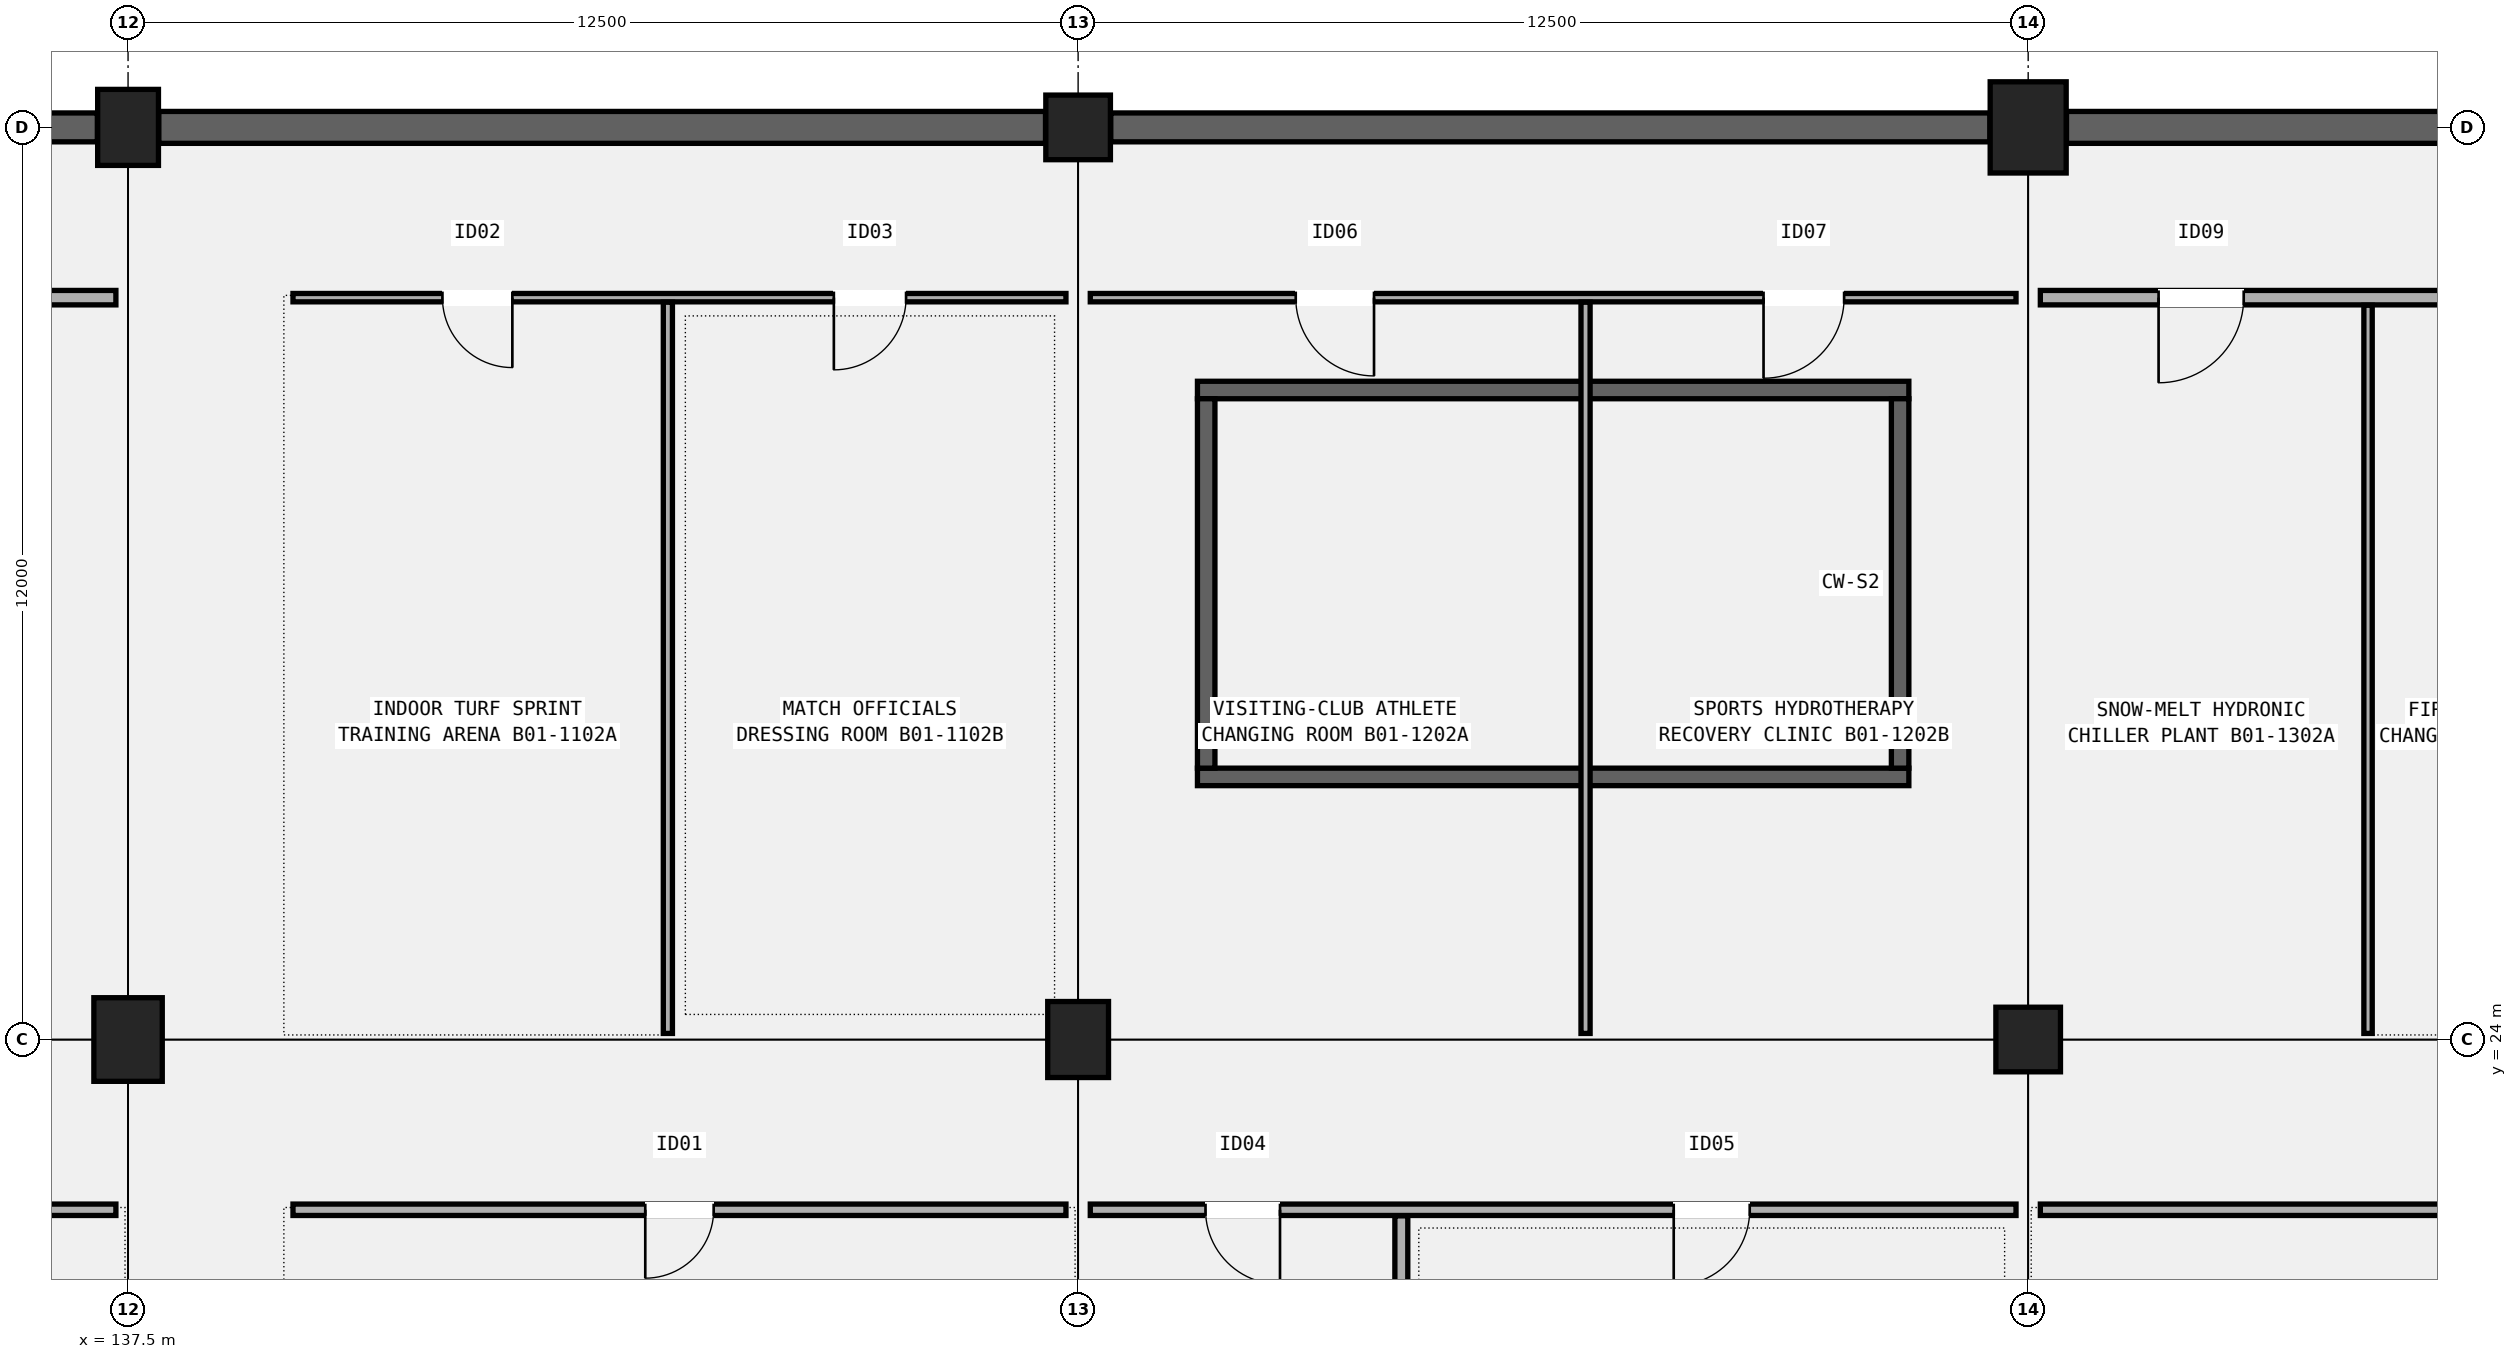
"""IFC4 building model, lengths in metres.
Left out: names, types, materials, properties, quantities, classifications, styles, units other than length and angle.
Written with IfcOpenShell. Run it as: python <this file> out.ifc"""

import sys

from ifc_helpers import new_model, si_unit, direction, frame, frame_2d, origin, origin_2d, place, context, subcontext, project, spatial, rectangle, circle, extrude, element, fill, save


model = new_model("IFC4")
c1 = context("Model", 3, precision=1e-05, world=origin(), true_north=direction((0.0, 1.0)))
c2 = subcontext(c1, "Body", "Model", "MODEL_VIEW")
j1 = project(units=[si_unit("LENGTHUNIT", "METRE"), si_unit("PLANEANGLEUNIT", "RADIAN")], contexts=[c1])
p1 = place(None, origin())
s1 = spatial("IfcSite", under=j1, at=p1, CompositionType="ELEMENT")
p2 = place(p1, origin())
s2 = spatial("IfcBuilding", under=s1, at=p2, CompositionType="ELEMENT")
p3 = place(p2, frame((0.0, 0.0, -4.8)))
s3 = spatial("IfcBuildingStorey", under=s2, at=p3, CompositionType="ELEMENT", Elevation=-4.8)
p4 = place(p3, frame((137.5, 24.0, 0.0), z_axis=(0.0, 0.0, 1.0), x_axis=(1.0, 0.0, 0.0)))
e1 = element("IfcColumn", 1, at=p4, inside=s3, PredefinedType="COLUMN", context=c2, shape_type="SweptSolid", body=[
    extrude(rectangle(XDim=0.9, YDim=1.1, at=origin_2d()), origin(), (0.0, 0.0, 1.0), 4.8),
])
for number, where, z_axis, x_axis in (
    (2, (137.5, 36.0, 0.0), (0.0, 0.0, 1.0), (1.0, 0.0, 0.0)),
    (3, (150.0, 24.0, 0.0), (0.0, 0.0, 1.0), (1.0, 0.0, 0.0)),
):
    element("IfcColumn", number, at=place(p3, frame(where, z_axis=z_axis, x_axis=x_axis)), inside=s3, PredefinedType="COLUMN", context=c2, shape_type="SweptSolid", body=[
        extrude(rectangle(XDim=0.8, YDim=1.0, at=origin_2d()), origin(), (0.0, 0.0, 1.0), 4.8),
    ])
for number, where, z_axis, x_axis in (
    (4, (150.0, 36.0, 0.0), (0.0, 0.0, 1.0), (1.0, 0.0, 0.0)),
    (5, (162.5, 24.0, 0.0), (0.0, 0.0, 1.0), (1.0, 0.0, 0.0)),
):
    element("IfcColumn", number, at=place(p3, frame(where, z_axis=z_axis, x_axis=x_axis)), inside=s3, PredefinedType="COLUMN", context=c2, shape_type="SweptSolid", body=[
        extrude(circle(Radius=0.425, at=origin_2d()), origin(), (0.0, 0.0, 1.0), 4.8),
    ])
p5 = place(p3, frame((162.5, 36.0, 0.0), z_axis=(0.0, 0.0, 1.0), x_axis=(1.0, 0.0, 0.0)))
e6 = element("IfcColumn", 6, at=p5, inside=s3, PredefinedType="COLUMN", context=c2, shape_type="SweptSolid", body=[
    extrude(rectangle(XDim=1.0, YDim=1.2, at=origin_2d()), origin(), (0.0, 0.0, 1.0), 4.8),
])
p6 = place(p3, frame((125.454, 36.0, 0.0), z_axis=(0.0, 0.0, 1.0), x_axis=(1.0, 0.0, 0.0)))
e7 = element("IfcWall", 7, at=p6, inside=s3, PredefinedType="STANDARD", context=c2, shape_type="SweptSolid", body=[
    extrude(rectangle(XDim=11.642, YDim=0.38, at=frame_2d((5.821, 0.0))), origin(), (0.0, 0.0, 1.0), 4.46),
])
p7 = place(p3, frame((137.904, 36.0, 0.0), z_axis=(0.0, 0.0, 1.0), x_axis=(1.0, 0.0, 0.0)))
e8 = element("IfcWall", 8, at=p7, inside=s3, PredefinedType="STANDARD", context=c2, shape_type="SweptSolid", body=[
    extrude(rectangle(XDim=11.667, YDim=0.42, at=frame_2d((5.833, 0.0))), origin(), (0.0, 0.0, 1.0), 4.46),
])
p8 = place(p3, frame((150.429, 36.0, 0.0), z_axis=(0.0, 0.0, 1.0), x_axis=(1.0, 0.0, 0.0)))
e9 = element("IfcWall", 9, at=p8, inside=s3, PredefinedType="STANDARD", context=c2, shape_type="SweptSolid", body=[
    extrude(rectangle(XDim=11.567, YDim=0.38, at=frame_2d((5.784, 0.0))), origin(), (0.0, 0.0, 1.0), 4.46),
])
p9 = place(p3, frame((163.004, 36.0, 0.0), z_axis=(0.0, 0.0, 1.0), x_axis=(1.0, 0.0, 0.0)))
e10 = element("IfcWall", 10, at=p9, inside=s3, PredefinedType="STANDARD", context=c2, shape_type="SweptSolid", body=[
    extrude(rectangle(XDim=11.542, YDim=0.42, at=frame_2d((5.771, 0.0))), origin(), (0.0, 0.0, 1.0), 4.46),
])
for number, where, z_axis, x_axis in (
    (11, (151.57, 27.455, 0.0), (0.0, 0.0, 1.0), (1.0, 0.0, 0.0)),
    (12, (151.57, 32.545, 0.0), (0.0, 0.0, 1.0), (1.0, 0.0, 0.0)),
):
    element("IfcWall", number, at=place(p3, frame(where, z_axis=z_axis, x_axis=x_axis)), inside=s3, PredefinedType="SHEAR", context=c2, shape_type="SweptSolid", body=[
        extrude(rectangle(XDim=9.36, YDim=0.23, at=frame_2d((4.68, 0.0))), origin(), (0.0, 0.0, 1.0), 4.5),
    ])
for number, where, z_axis, x_axis in (
    (13, (151.685, 27.57, 0.0), (0.0, 0.0, 1.0), (0.0, 1.0, 0.0)),
    (14, (160.815, 27.57, 0.0), (0.0, 0.0, 1.0), (0.0, 1.0, 0.0)),
):
    element("IfcWall", number, at=place(p3, frame(where, z_axis=z_axis, x_axis=x_axis)), inside=s3, PredefinedType="SHEAR", context=c2, shape_type="SweptSolid", body=[
        extrude(rectangle(XDim=4.86, YDim=0.23, at=frame_2d((2.43, 0.0))), origin(), (0.0, 0.0, 1.0), 4.5),
    ])
p10 = place(p3, frame((125.16, 21.76, 0.0), z_axis=(0.0, 0.0, 1.0), x_axis=(1.0, 0.0, 0.0)))
e15 = element("IfcWall", 15, at=p10, inside=s3, PredefinedType="PARTITIONING", context=c2, shape_type="SweptSolid", body=[
    extrude(rectangle(XDim=12.18, YDim=0.15, at=frame_2d((6.09, 0.0))), origin(), (0.0, 0.0, 1.0), 3.92),
])
p11 = place(p10, frame((6.915, 0.0, 0.0), z_axis=(0.0, 0.0, 1.0), x_axis=(-1.0, 0.0, 0.0)))
e16 = element("IfcOpeningElement", 16, at=p11, cuts=e15, PredefinedType="OPENING", context=c2, shape_type="SweptSolid", body=[
    extrude(rectangle(XDim=1.65, YDim=2.28, at=frame_2d((0.825, 1.14))), frame((0.0, 0.085, 0.0), z_axis=(0.0, -1.0, 0.0), x_axis=(1.0, 0.0, 0.0)), (0.0, 0.0, 1.0), 0.17),
])
p12 = place(p3, frame((125.16, 33.76, 0.0), z_axis=(0.0, 0.0, 1.0), x_axis=(1.0, 0.0, 0.0)))
e17 = element("IfcWall", 17, at=p12, inside=s3, PredefinedType="PARTITIONING", context=c2, shape_type="SweptSolid", body=[
    extrude(rectangle(XDim=12.18, YDim=0.19, at=frame_2d((6.09, 0.0))), origin(), (0.0, 0.0, 1.0), 3.92),
])
p13 = place(p12, frame((2.747, 0.0, 0.0), z_axis=(0.0, 0.0, 1.0), x_axis=(-1.0, 0.0, 0.0)))
e18 = element("IfcOpeningElement", 18, at=p13, cuts=e17, PredefinedType="OPENING", context=c2, shape_type="SweptSolid", body=[
    extrude(rectangle(XDim=1.7, YDim=2.32, at=frame_2d((0.85, 1.16))), frame((0.0, 0.105, 0.0), z_axis=(0.0, -1.0, 0.0), x_axis=(1.0, 0.0, 0.0)), (0.0, 0.0, 1.0), 0.21),
])
p14 = place(p12, frame((8.947, 0.0, 0.0), z_axis=(0.0, 0.0, 1.0), x_axis=(-1.0, 0.0, 0.0)))
e19 = element("IfcOpeningElement", 19, at=p14, cuts=e17, PredefinedType="OPENING", context=c2, shape_type="SweptSolid", body=[
    extrude(rectangle(XDim=1.76, YDim=2.3, at=frame_2d((0.88, 1.15))), frame((0.0, 0.105, 0.0), z_axis=(0.0, -1.0, 0.0), x_axis=(1.0, 0.0, 0.0)), (0.0, 0.0, 1.0), 0.21),
])
p15 = place(p3, frame((139.67, 21.76, 0.0), z_axis=(0.0, 0.0, 1.0), x_axis=(1.0, 0.0, 0.0)))
e20 = element("IfcWall", 20, at=p15, inside=s3, PredefinedType="PARTITIONING", context=c2, shape_type="SweptSolid", body=[
    extrude(rectangle(XDim=10.17, YDim=0.15, at=frame_2d((5.085, 0.0))), origin(), (0.0, 0.0, 1.0), 3.92),
])
p16 = place(p15, frame((5.535, 0.0, 0.0), z_axis=(0.0, 0.0, 1.0), x_axis=(-1.0, 0.0, 0.0)))
e21 = element("IfcOpeningElement", 21, at=p16, cuts=e20, PredefinedType="OPENING", context=c2, shape_type="SweptSolid", body=[
    extrude(rectangle(XDim=0.9, YDim=2.06, at=frame_2d((0.45, 1.03))), frame((0.0, 0.085, 0.0), z_axis=(0.0, -1.0, 0.0), x_axis=(1.0, 0.0, 0.0)), (0.0, 0.0, 1.0), 0.17),
])
p17 = place(p3, frame((139.67, 33.76, 0.0), z_axis=(0.0, 0.0, 1.0), x_axis=(1.0, 0.0, 0.0)))
e22 = element("IfcWall", 22, at=p17, inside=s3, PredefinedType="PARTITIONING", context=c2, shape_type="SweptSolid", body=[
    extrude(rectangle(XDim=10.17, YDim=0.11, at=frame_2d((5.085, 0.0))), origin(), (0.0, 0.0, 1.0), 3.92),
])
p18 = place(p17, frame((2.886, 0.0, 0.0), z_axis=(0.0, 0.0, 1.0), x_axis=(-1.0, 0.0, 0.0)))
e23 = element("IfcOpeningElement", 23, at=p18, cuts=e22, PredefinedType="OPENING", context=c2, shape_type="SweptSolid", body=[
    extrude(rectangle(XDim=0.92, YDim=2.1, at=frame_2d((0.46, 1.05))), frame((0.0, 0.065, 0.0), z_axis=(0.0, -1.0, 0.0), x_axis=(1.0, 0.0, 0.0)), (0.0, 0.0, 1.0), 0.13),
])
p19 = place(p17, frame((8.066, 0.0, 0.0), z_axis=(0.0, 0.0, 1.0), x_axis=(-1.0, 0.0, 0.0)))
e24 = element("IfcOpeningElement", 24, at=p19, cuts=e22, PredefinedType="OPENING", context=c2, shape_type="SweptSolid", body=[
    extrude(rectangle(XDim=0.95, YDim=2.12, at=frame_2d((0.475, 1.06))), frame((0.0, 0.065, 0.0), z_axis=(0.0, -1.0, 0.0), x_axis=(1.0, 0.0, 0.0)), (0.0, 0.0, 1.0), 0.13),
])
p20 = place(p3, frame((144.602, 24.08, 0.0), z_axis=(0.0, 0.0, 1.0), x_axis=(0.0, 1.0, 0.0)))
e25 = element("IfcWall", 25, at=p20, inside=s3, PredefinedType="PARTITIONING", context=c2, shape_type="SweptSolid", body=[
    extrude(rectangle(XDim=9.62, YDim=0.12, at=frame_2d((4.81, 0.0))), origin(), (0.0, 0.0, 1.0), 3.92),
])
p21 = place(p3, frame((150.16, 21.76, 0.0), z_axis=(0.0, 0.0, 1.0), x_axis=(1.0, 0.0, 0.0)))
e26 = element("IfcWall", 26, at=p21, inside=s3, PredefinedType="PARTITIONING", context=c2, shape_type="SweptSolid", body=[
    extrude(rectangle(XDim=12.18, YDim=0.15, at=frame_2d((6.09, 0.0))), origin(), (0.0, 0.0, 1.0), 3.92),
])
p22 = place(p21, frame((2.496, 0.0, 0.0), z_axis=(0.0, 0.0, 1.0), x_axis=(-1.0, 0.0, 0.0)))
e27 = element("IfcOpeningElement", 27, at=p22, cuts=e26, PredefinedType="OPENING", context=c2, shape_type="SweptSolid", body=[
    extrude(rectangle(XDim=0.98, YDim=2.1, at=frame_2d((0.49, 1.05))), frame((0.0, 0.085, 0.0), z_axis=(0.0, -1.0, 0.0), x_axis=(1.0, 0.0, 0.0)), (0.0, 0.0, 1.0), 0.17),
])
p23 = place(p21, frame((8.676, 0.0, 0.0), z_axis=(0.0, 0.0, 1.0), x_axis=(-1.0, 0.0, 0.0)))
e28 = element("IfcOpeningElement", 28, at=p23, cuts=e26, PredefinedType="OPENING", context=c2, shape_type="SweptSolid", body=[
    extrude(rectangle(XDim=1.0, YDim=2.14, at=frame_2d((0.5, 1.07))), frame((0.0, 0.085, 0.0), z_axis=(0.0, -1.0, 0.0), x_axis=(1.0, 0.0, 0.0)), (0.0, 0.0, 1.0), 0.17),
])
p24 = place(p3, frame((154.252, 12.192, 0.0), z_axis=(0.0, 0.0, 1.0), x_axis=(0.0, 1.0, 0.0)))
e29 = element("IfcWall", 29, at=p24, inside=s3, PredefinedType="PARTITIONING", context=c2, shape_type="SweptSolid", body=[
    extrude(rectangle(XDim=9.488, YDim=0.17, at=frame_2d((4.744, 0.0))), origin(), (0.0, 0.0, 1.0), 3.92),
])
p25 = place(p3, frame((150.16, 33.76, 0.0), z_axis=(0.0, 0.0, 1.0), x_axis=(1.0, 0.0, 0.0)))
e30 = element("IfcWall", 30, at=p25, inside=s3, PredefinedType="PARTITIONING", context=c2, shape_type="SweptSolid", body=[
    extrude(rectangle(XDim=12.18, YDim=0.11, at=frame_2d((6.09, 0.0))), origin(), (0.0, 0.0, 1.0), 3.92),
])
p26 = place(p25, frame((3.733, 0.0, 0.0), z_axis=(0.0, 0.0, 1.0), x_axis=(-1.0, 0.0, 0.0)))
e31 = element("IfcOpeningElement", 31, at=p26, cuts=e30, PredefinedType="OPENING", context=c2, shape_type="SweptSolid", body=[
    extrude(rectangle(XDim=1.03, YDim=2.12, at=frame_2d((0.515, 1.06))), frame((0.0, 0.065, 0.0), z_axis=(0.0, -1.0, 0.0), x_axis=(1.0, 0.0, 0.0)), (0.0, 0.0, 1.0), 0.13),
])
p27 = place(p25, frame((9.918, 0.0, 0.0), z_axis=(0.0, 0.0, 1.0), x_axis=(-1.0, 0.0, 0.0)))
e32 = element("IfcOpeningElement", 32, at=p27, cuts=e30, PredefinedType="OPENING", context=c2, shape_type="SweptSolid", body=[
    extrude(rectangle(XDim=1.06, YDim=2.15, at=frame_2d((0.53, 1.075))), frame((0.0, 0.065, 0.0), z_axis=(0.0, -1.0, 0.0), x_axis=(1.0, 0.0, 0.0)), (0.0, 0.0, 1.0), 0.13),
])
p28 = place(p3, frame((156.676, 24.08, 0.0), z_axis=(0.0, 0.0, 1.0), x_axis=(0.0, 1.0, 0.0)))
e33 = element("IfcWall", 33, at=p28, inside=s3, PredefinedType="PARTITIONING", context=c2, shape_type="SweptSolid", body=[
    extrude(rectangle(XDim=9.62, YDim=0.12, at=frame_2d((4.81, 0.0))), origin(), (0.0, 0.0, 1.0), 3.92),
])
p29 = place(p3, frame((162.66, 21.76, 0.0), z_axis=(0.0, 0.0, 1.0), x_axis=(1.0, 0.0, 0.0)))
e34 = element("IfcWall", 34, at=p29, inside=s3, PredefinedType="PARTITIONING", context=c2, shape_type="SweptSolid", body=[
    extrude(rectangle(XDim=12.148, YDim=0.15, at=frame_2d((6.074, 0.0))), origin(), (0.0, 0.0, 1.0), 3.92),
])
p30 = place(p29, frame((6.635, 0.0, 0.0), z_axis=(0.0, 0.0, 1.0), x_axis=(-1.0, 0.0, 0.0)))
e35 = element("IfcOpeningElement", 35, at=p30, cuts=e34, PredefinedType="OPENING", context=c2, shape_type="SweptSolid", body=[
    extrude(rectangle(XDim=1.09, YDim=2.16, at=frame_2d((0.545, 1.08))), frame((0.0, 0.085, 0.0), z_axis=(0.0, -1.0, 0.0), x_axis=(1.0, 0.0, 0.0)), (0.0, 0.0, 1.0), 0.17),
])
p31 = place(p3, frame((162.66, 33.76, 0.0), z_axis=(0.0, 0.0, 1.0), x_axis=(1.0, 0.0, 0.0)))
e36 = element("IfcWall", 36, at=p31, inside=s3, PredefinedType="PARTITIONING", context=c2, shape_type="SweptSolid", body=[
    extrude(rectangle(XDim=12.18, YDim=0.19, at=frame_2d((6.09, 0.0))), origin(), (0.0, 0.0, 1.0), 3.92),
])
p32 = place(p31, frame((2.676, 0.0, 0.0), z_axis=(0.0, 0.0, 1.0), x_axis=(-1.0, 0.0, 0.0)))
e37 = element("IfcOpeningElement", 37, at=p32, cuts=e36, PredefinedType="OPENING", context=c2, shape_type="SweptSolid", body=[
    extrude(rectangle(XDim=1.12, YDim=2.18, at=frame_2d((0.56, 1.09))), frame((0.0, 0.105, 0.0), z_axis=(0.0, -1.0, 0.0), x_axis=(1.0, 0.0, 0.0)), (0.0, 0.0, 1.0), 0.21),
])
p33 = place(p31, frame((8.861, 0.0, 0.0), z_axis=(0.0, 0.0, 1.0), x_axis=(-1.0, 0.0, 0.0)))
e38 = element("IfcOpeningElement", 38, at=p33, cuts=e36, PredefinedType="OPENING", context=c2, shape_type="SweptSolid", body=[
    extrude(rectangle(XDim=1.15, YDim=2.15, at=frame_2d((0.575, 1.075))), frame((0.0, 0.105, 0.0), z_axis=(0.0, -1.0, 0.0), x_axis=(1.0, 0.0, 0.0)), (0.0, 0.0, 1.0), 0.21),
])
p34 = place(p3, frame((166.972, 24.08, 0.0), z_axis=(0.0, 0.0, 1.0), x_axis=(0.0, 1.0, 0.0)))
e39 = element("IfcWall", 39, at=p34, inside=s3, PredefinedType="PARTITIONING", context=c2, shape_type="SweptSolid", body=[
    extrude(rectangle(XDim=9.58, YDim=0.11, at=frame_2d((4.79, 0.0))), origin(), (0.0, 0.0, 1.0), 3.92),
])
p35 = place(p16, origin())
e40 = element("IfcDoor", 40, at=p35, inside=s3, OperationType="SINGLE_SWING_RIGHT", PredefinedType="DOOR", context=c2, shape_type="SweptSolid", body=[
    extrude(rectangle(XDim=0.9, YDim=2.06, at=frame_2d((0.45, 1.03))), frame((0.0, 0.025, 0.0), z_axis=(0.0, -1.0, 0.0), x_axis=(1.0, 0.0, 0.0)), (0.0, 0.0, 1.0), 0.05),
])
fill(e21, e40)
p36 = place(p18, origin())
e41 = element("IfcDoor", 41, at=p36, inside=s3, OperationType="SINGLE_SWING_LEFT", PredefinedType="DOOR", context=c2, shape_type="SweptSolid", body=[
    extrude(rectangle(XDim=0.92, YDim=2.1, at=frame_2d((0.46, 1.05))), frame((0.0, 0.025, 0.0), z_axis=(0.0, -1.0, 0.0), x_axis=(1.0, 0.0, 0.0)), (0.0, 0.0, 1.0), 0.05),
])
fill(e23, e41)
p37 = place(p19, origin())
e42 = element("IfcDoor", 42, at=p37, inside=s3, OperationType="SINGLE_SWING_RIGHT", PredefinedType="DOOR", context=c2, shape_type="SweptSolid", body=[
    extrude(rectangle(XDim=0.95, YDim=2.12, at=frame_2d((0.475, 1.06))), frame((0.0, 0.025, 0.0), z_axis=(0.0, -1.0, 0.0), x_axis=(1.0, 0.0, 0.0)), (0.0, 0.0, 1.0), 0.05),
])
fill(e24, e42)
p38 = place(p22, origin())
e43 = element("IfcDoor", 43, at=p38, inside=s3, OperationType="SINGLE_SWING_LEFT", PredefinedType="DOOR", context=c2, shape_type="SweptSolid", body=[
    extrude(rectangle(XDim=0.98, YDim=2.1, at=frame_2d((0.49, 1.05))), frame((0.0, 0.025, 0.0), z_axis=(0.0, -1.0, 0.0), x_axis=(1.0, 0.0, 0.0)), (0.0, 0.0, 1.0), 0.05),
])
fill(e27, e43)
p39 = place(p23, origin())
e44 = element("IfcDoor", 44, at=p39, inside=s3, OperationType="SINGLE_SWING_RIGHT", PredefinedType="DOOR", context=c2, shape_type="SweptSolid", body=[
    extrude(rectangle(XDim=1.0, YDim=2.14, at=frame_2d((0.5, 1.07))), frame((0.0, 0.025, 0.0), z_axis=(0.0, -1.0, 0.0), x_axis=(1.0, 0.0, 0.0)), (0.0, 0.0, 1.0), 0.05),
])
fill(e28, e44)
p40 = place(p26, origin())
e45 = element("IfcDoor", 45, at=p40, inside=s3, OperationType="SINGLE_SWING_LEFT", PredefinedType="DOOR", context=c2, shape_type="SweptSolid", body=[
    extrude(rectangle(XDim=1.03, YDim=2.12, at=frame_2d((0.515, 1.06))), frame((0.0, 0.025, 0.0), z_axis=(0.0, -1.0, 0.0), x_axis=(1.0, 0.0, 0.0)), (0.0, 0.0, 1.0), 0.05),
])
fill(e31, e45)
p41 = place(p27, origin())
e46 = element("IfcDoor", 46, at=p41, inside=s3, OperationType="SINGLE_SWING_RIGHT", PredefinedType="DOOR", context=c2, shape_type="SweptSolid", body=[
    extrude(rectangle(XDim=1.06, YDim=2.15, at=frame_2d((0.53, 1.075))), frame((0.0, 0.025, 0.0), z_axis=(0.0, -1.0, 0.0), x_axis=(1.0, 0.0, 0.0)), (0.0, 0.0, 1.0), 0.05),
])
fill(e32, e46)
p42 = place(p32, origin())
e47 = element("IfcDoor", 47, at=p42, inside=s3, OperationType="SINGLE_SWING_RIGHT", PredefinedType="DOOR", context=c2, shape_type="SweptSolid", body=[
    extrude(rectangle(XDim=1.12, YDim=2.18, at=frame_2d((0.56, 1.09))), frame((0.0, 0.025, 0.0), z_axis=(0.0, -1.0, 0.0), x_axis=(1.0, 0.0, 0.0)), (0.0, 0.0, 1.0), 0.05),
])
fill(e37, e47)
save(model, sys.argv[1])
